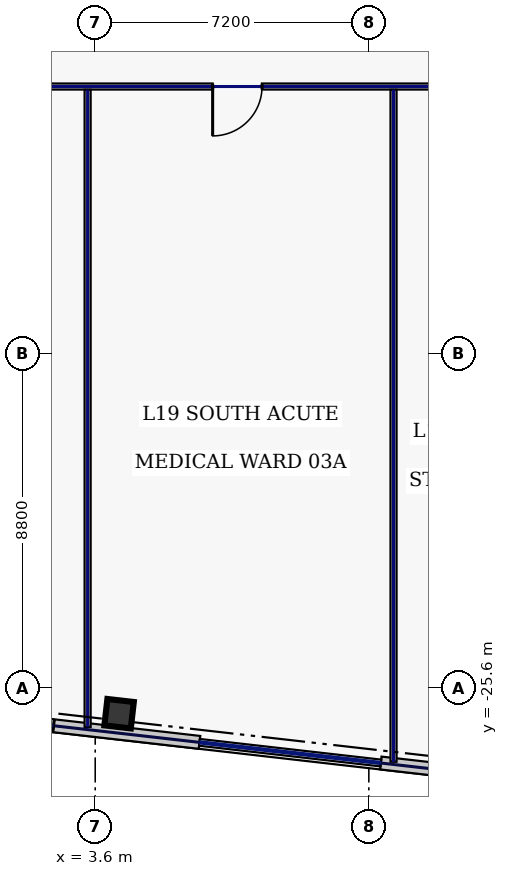
"""IFC4 building model, lengths in metres.
Left out: names, types, materials, properties, quantities, classifications, styles, units other than length and angle.
Written with IfcOpenShell. Run it as: python <this file> out.ifc"""

import sys

from ifc_helpers import new_model, si_unit, direction, frame, frame_2d, origin, origin_2d, place, context, subcontext, project, spatial, rectangle, hollow_rectangle, extrude, element, fill, save


model = new_model("IFC4")
c1 = context("Model", 3, precision=1e-05, world=origin(), true_north=direction((0.0, 1.0)))
c2 = subcontext(c1, "Body", "Model", "MODEL_VIEW")
j1 = project(units=[si_unit("LENGTHUNIT", "METRE"), si_unit("PLANEANGLEUNIT", "RADIAN")], contexts=[c1])
p1 = place(None, origin())
s1 = spatial("IfcSite", under=j1, at=p1, CompositionType="ELEMENT")
p2 = place(p1, origin())
s2 = spatial("IfcBuilding", under=s1, at=p2, CompositionType="ELEMENT")
p3 = place(p2, frame((0.0, 0.0, 89.4)))
s3 = spatial("IfcBuildingStorey", under=s2, at=p3, CompositionType="ELEMENT", Elevation=89.4)
p4 = place(p3, frame((4.229, -26.284, 0.0), z_axis=(0.0, 0.0, 1.0), x_axis=(0.993571855677, -0.113203213768, 0.0)))
e1 = element("IfcColumn", 1, at=p4, inside=s3, PredefinedType="COLUMN", context=c2, shape_type="SweptSolid", body=[
    extrude(hollow_rectangle(XDim=0.7, YDim=0.7, WallThickness=0.032, at=origin_2d()), origin(), (0.0, 0.0, 1.0), 3.74),
])
p5 = place(p3, frame((-7.122, -25.504, 0.0), z_axis=(0.0, 0.0, 1.0), x_axis=(0.993571685551, -0.11320470693, 0.0)))
e2 = element("IfcWall", 2, at=p5, inside=s3, PredefinedType="STANDARD", context=c2, shape_type="SweptSolid", body=[
    extrude(rectangle(XDim=13.554, YDim=0.34, at=frame_2d((6.777, 0.0))), origin(), (0.0, 0.0, 1.0), 3.74),
])
p6 = place(p5, frame((8.088, 0.0, 0.22)))
e3 = element("IfcOpeningElement", 3, at=p6, cuts=e2, PredefinedType="OPENING", context=c2, shape_type="SweptSolid", body=[
    extrude(rectangle(XDim=1.6, YDim=1.2, at=frame_2d((0.8, 0.6))), frame((0.0, 0.18, 0.0), z_axis=(0.0, -1.0, 0.0), x_axis=(1.0, 0.0, 0.0)), (0.0, 0.0, 1.0), 0.36),
])
p7 = place(p3, frame((11.115, -27.582, 0.0), z_axis=(0.0, 0.0, 1.0), x_axis=(0.993572655904, -0.113196190044, 0.0)))
e4 = element("IfcWall", 4, at=p7, inside=s3, PredefinedType="STANDARD", context=c2, shape_type="SweptSolid", body=[
    extrude(rectangle(XDim=21.223, YDim=0.34, at=frame_2d((10.611, 0.0))), origin(), (0.0, 0.0, 1.0), 3.74),
])
p8 = place(p7, frame((3.866, 0.0, 0.22)))
e5 = element("IfcOpeningElement", 5, at=p8, cuts=e4, PredefinedType="OPENING", context=c2, shape_type="SweptSolid", body=[
    extrude(rectangle(XDim=1.6, YDim=1.2, at=frame_2d((0.8, 0.6))), frame((0.0, 0.18, 0.0), z_axis=(0.0, -1.0, 0.0), x_axis=(1.0, 0.0, 0.0)), (0.0, 0.0, 1.0), 0.36),
])
p9 = place(p7, frame((17.265, 0.0, 0.22)))
e6 = element("IfcOpeningElement", 6, at=p9, cuts=e4, PredefinedType="OPENING", context=c2, shape_type="SweptSolid", body=[
    extrude(rectangle(XDim=1.6, YDim=1.2, at=frame_2d((0.8, 0.6))), frame((0.0, 0.18, 0.0), z_axis=(0.0, -1.0, 0.0), x_axis=(1.0, 0.0, 0.0)), (0.0, 0.0, 1.0), 0.36),
])
p10 = place(p3, frame((27.465, -9.78, 0.0), z_axis=(0.0, 0.0, 1.0), x_axis=(-1.0, 0.0, 0.0)))
e7 = element("IfcWall", 7, at=p10, inside=s3, PredefinedType="PARTITIONING", context=c2, shape_type="SweptSolid", body=[
    extrude(rectangle(XDim=54.93, YDim=0.16, at=frame_2d((27.465, 0.0))), origin(), (0.0, 0.0, 1.0), 3.74),
])
p11 = place(p10, frame((49.256, 0.0, 0.0)))
e8 = element("IfcOpeningElement", 8, at=p11, cuts=e7, PredefinedType="OPENING", context=c2, shape_type="SweptSolid", body=[
    extrude(rectangle(XDim=0.95, YDim=2.2, at=frame_2d((0.475, 1.1))), frame((0.0, 0.09, 0.0), z_axis=(0.0, -1.0, 0.0), x_axis=(1.0, 0.0, 0.0)), (0.0, 0.0, 1.0), 0.18),
])
p12 = place(p10, frame((39.5, 0.0, 0.0)))
e9 = element("IfcOpeningElement", 9, at=p12, cuts=e7, PredefinedType="OPENING", context=c2, shape_type="SweptSolid", body=[
    extrude(rectangle(XDim=0.95, YDim=2.2, at=frame_2d((0.475, 1.1))), frame((0.0, 0.09, 0.0), z_axis=(0.0, -1.0, 0.0), x_axis=(1.0, 0.0, 0.0)), (0.0, 0.0, 1.0), 0.18),
])
p13 = place(p10, frame((28.425, 0.0, 0.0)))
e10 = element("IfcOpeningElement", 10, at=p13, cuts=e7, PredefinedType="OPENING", context=c2, shape_type="SweptSolid", body=[
    extrude(rectangle(XDim=1.3, YDim=2.2, at=frame_2d((0.65, 1.1))), frame((0.0, 0.09, 0.0), z_axis=(0.0, -1.0, 0.0), x_axis=(1.0, 0.0, 0.0)), (0.0, 0.0, 1.0), 0.18),
])
p14 = place(p10, frame((19.475, 0.0, 0.0)))
e11 = element("IfcOpeningElement", 11, at=p14, cuts=e7, PredefinedType="OPENING", context=c2, shape_type="SweptSolid", body=[
    extrude(rectangle(XDim=1.3, YDim=2.2, at=frame_2d((0.65, 1.1))), frame((0.0, 0.09, 0.0), z_axis=(0.0, -1.0, 0.0), x_axis=(1.0, 0.0, 0.0)), (0.0, 0.0, 1.0), 0.18),
])
p15 = place(p10, frame((11.875, 0.0, 0.0)))
e12 = element("IfcOpeningElement", 12, at=p15, cuts=e7, PredefinedType="OPENING", context=c2, shape_type="SweptSolid", body=[
    extrude(rectangle(XDim=1.45, YDim=2.2, at=frame_2d((0.725, 1.1))), frame((0.0, 0.09, 0.0), z_axis=(0.0, -1.0, 0.0), x_axis=(1.0, 0.0, 0.0)), (0.0, 0.0, 1.0), 0.18),
])
p16 = place(p10, frame((6.012, 0.0, 0.0)))
e13 = element("IfcOpeningElement", 13, at=p16, cuts=e7, PredefinedType="OPENING", context=c2, shape_type="SweptSolid", body=[
    extrude(rectangle(XDim=0.95, YDim=2.2, at=frame_2d((0.475, 1.1))), frame((0.0, 0.09, 0.0), z_axis=(0.0, -1.0, 0.0), x_axis=(1.0, 0.0, 0.0)), (0.0, 0.0, 1.0), 0.18),
])
p17 = place(p10, frame((1.732, 0.0, 0.0)))
e14 = element("IfcOpeningElement", 14, at=p17, cuts=e7, PredefinedType="OPENING", context=c2, shape_type="SweptSolid", body=[
    extrude(rectangle(XDim=0.95, YDim=2.2, at=frame_2d((0.475, 1.1))), frame((0.0, 0.09, 0.0), z_axis=(0.0, -1.0, 0.0), x_axis=(1.0, 0.0, 0.0)), (0.0, 0.0, 1.0), 0.18),
])
p18 = place(p3, frame((3.4, -26.633, 0.0), z_axis=(0.0, 0.0, 1.0), x_axis=(0.0, 1.0, 0.0)))
e15 = element("IfcWall", 15, at=p18, inside=s3, PredefinedType="PARTITIONING", context=c2, shape_type="SweptSolid", body=[
    extrude(rectangle(XDim=16.768, YDim=0.16, at=frame_2d((8.384, 0.0))), origin(), (0.0, 0.0, 1.0), 3.74),
])
p19 = place(p3, frame((11.45, -27.55, 0.0), z_axis=(0.0, 0.0, 1.0), x_axis=(0.0, 1.0, 0.0)))
e16 = element("IfcWall", 16, at=p19, inside=s3, PredefinedType="PARTITIONING", context=c2, shape_type="SweptSolid", body=[
    extrude(rectangle(XDim=17.685, YDim=0.16, at=frame_2d((8.843, 0.0))), origin(), (0.0, 0.0, 1.0), 3.74),
])
p20 = place(p6, origin())
e17 = element("IfcWindow", 17, at=p20, inside=s3, PartitioningType="SINGLE_PANEL", PredefinedType="WINDOW", context=c2, shape_type="SweptSolid", body=[
    extrude(rectangle(XDim=1.6, YDim=1.2, at=frame_2d((0.8, 0.6))), frame((0.0, 0.03, 0.0), z_axis=(0.0, -1.0, 0.0), x_axis=(1.0, 0.0, 0.0)), (0.0, 0.0, 1.0), 0.06),
])
fill(e3, e17)
p21 = place(p14, origin())
e18 = element("IfcDoor", 18, at=p21, inside=s3, OperationType="SINGLE_SWING_RIGHT", PredefinedType="DOOR", context=c2, shape_type="SweptSolid", body=[
    extrude(rectangle(XDim=1.3, YDim=2.2, at=frame_2d((0.65, 1.1))), frame((0.0, 0.025, 0.0), z_axis=(0.0, -1.0, 0.0), x_axis=(1.0, 0.0, 0.0)), (0.0, 0.0, 1.0), 0.05),
])
fill(e11, e18)
save(model, sys.argv[1])
